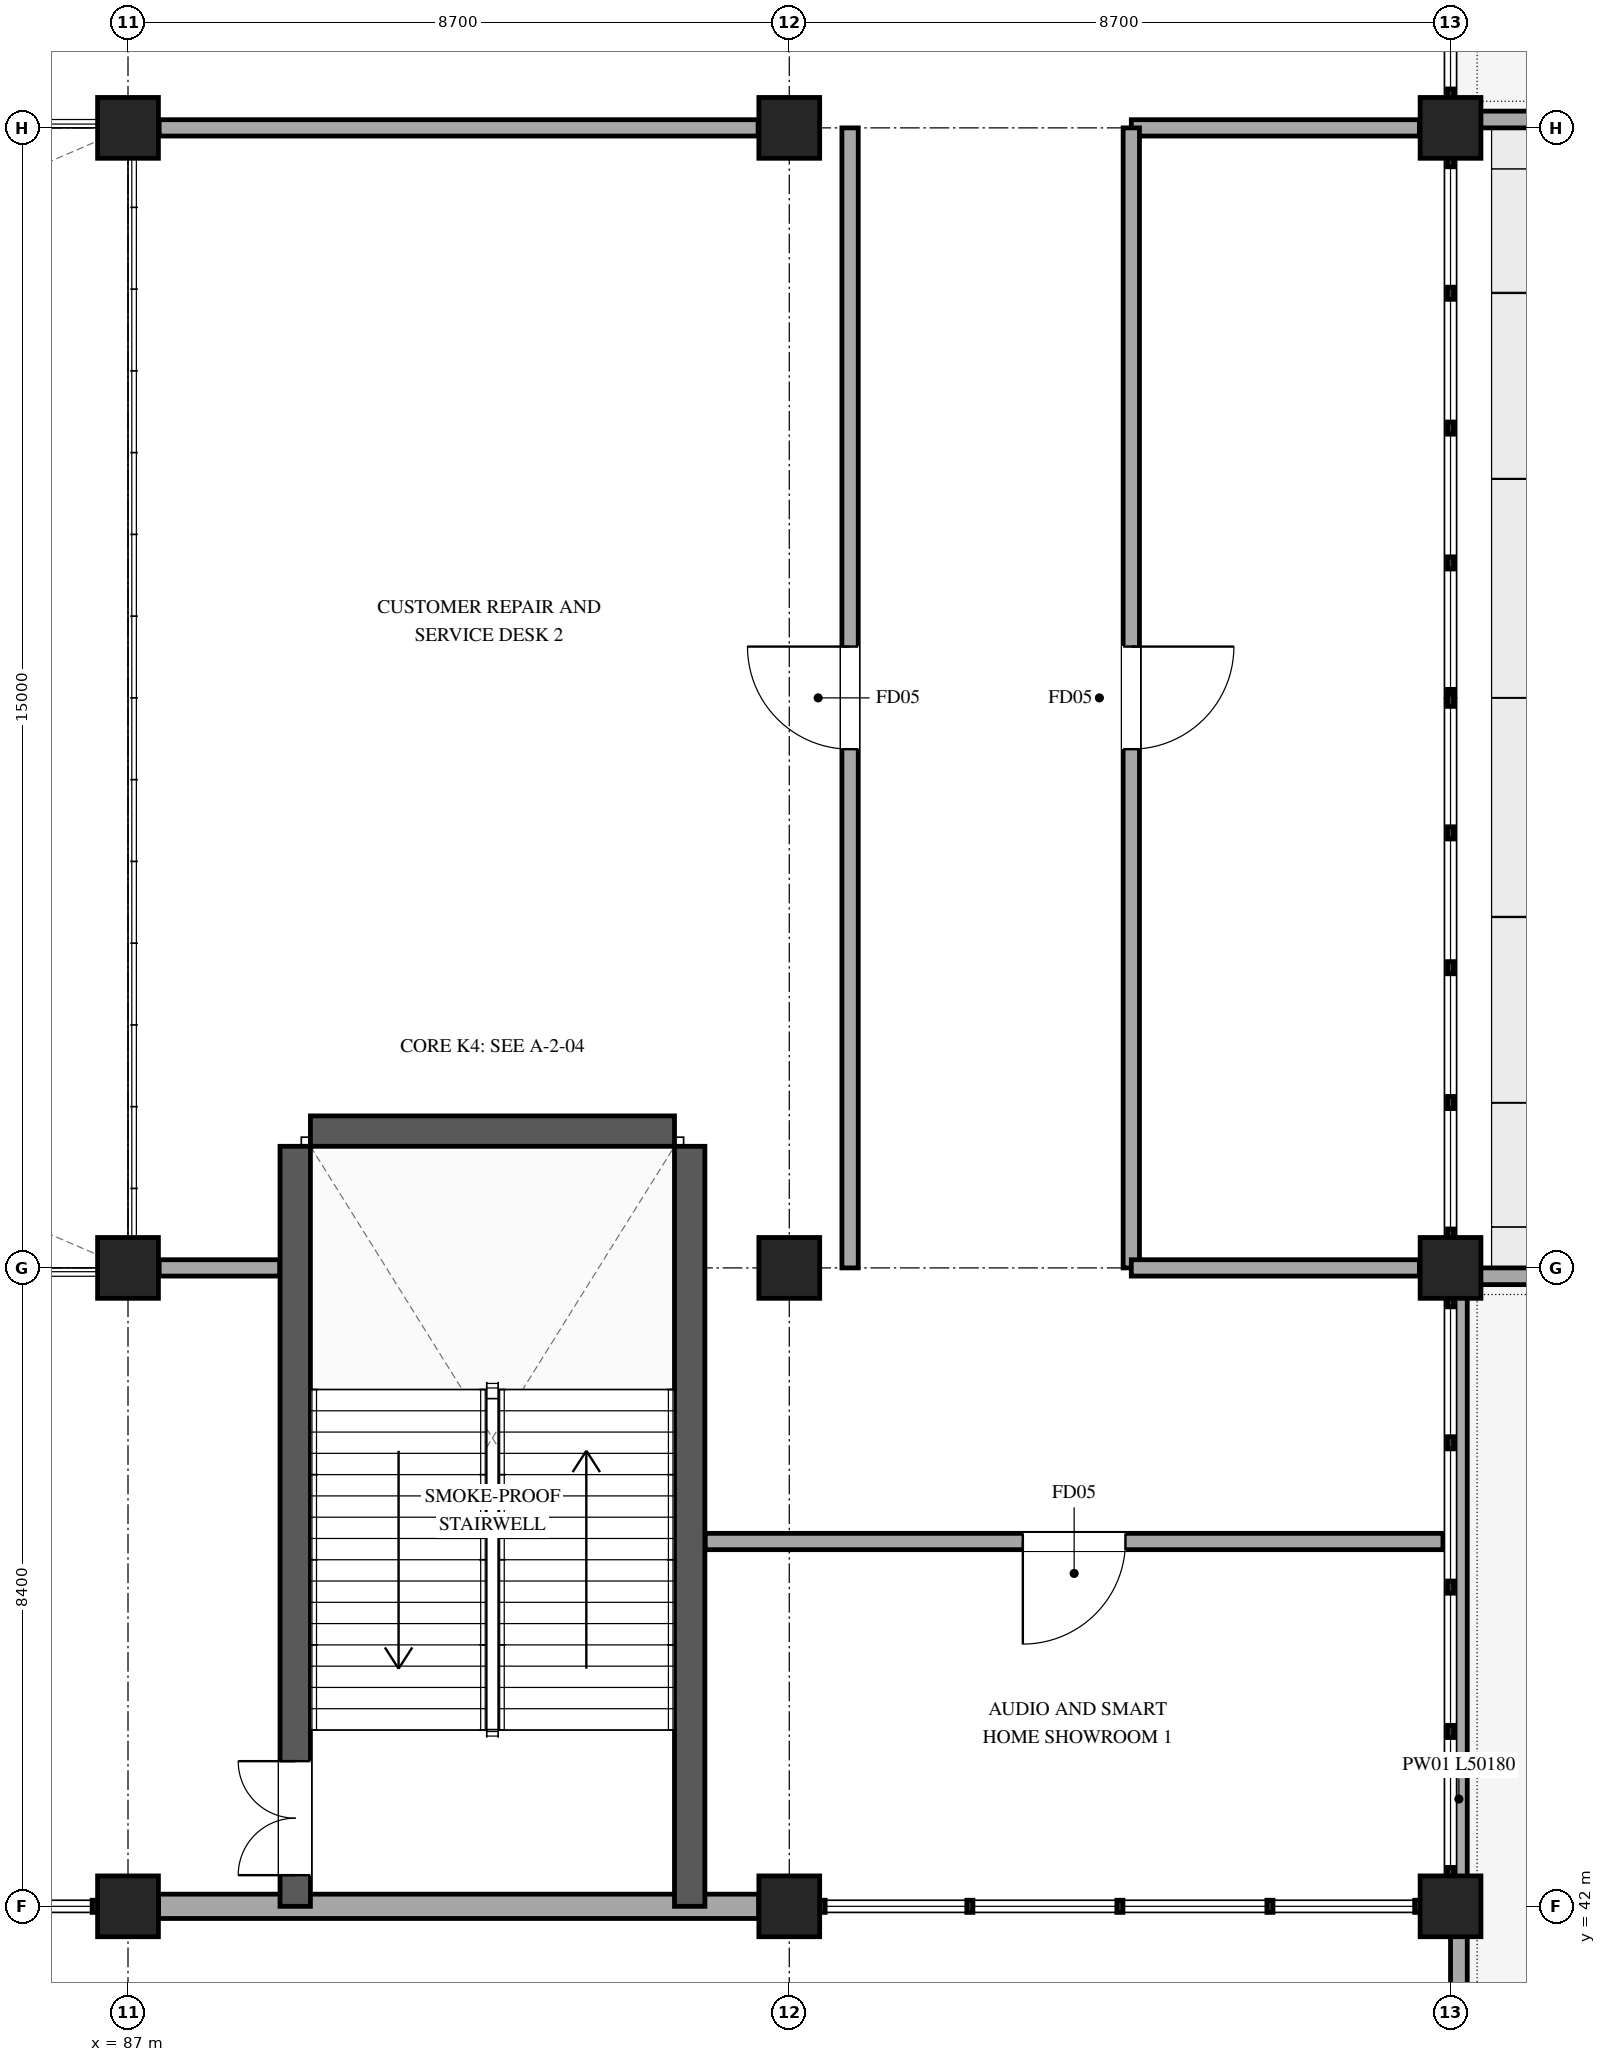
"""IFC4 building model, lengths in metres.
Left out: names, types, materials, properties, quantities, classifications, styles, units other than length and angle.
Written with IfcOpenShell. Run it as: python <this file> out.ifc"""

import sys

from ifc_helpers import new_model, si_unit, direction, frame, frame_2d, origin, origin_2d, place, context, subcontext, project, spatial, rectangle, extrude, element, fill, save


model = new_model("IFC4")
c1 = context("Model", 3, precision=1e-05, world=origin(), true_north=direction((0.0, 1.0)))
c2 = subcontext(c1, "Body", "Model", "MODEL_VIEW")
j1 = project(units=[si_unit("LENGTHUNIT", "METRE"), si_unit("PLANEANGLEUNIT", "RADIAN")], contexts=[c1])
p1 = place(None, origin())
s1 = spatial("IfcSite", under=j1, at=p1, CompositionType="ELEMENT")
p2 = place(p1, origin())
s2 = spatial("IfcBuilding", under=s1, at=p2, CompositionType="ELEMENT")
p3 = place(p2, frame((0.0, 0.0, 16.5)))
s3 = spatial("IfcBuildingStorey", under=s2, at=p3, CompositionType="ELEMENT", Elevation=16.5)
for number, where, z_axis, x_axis in (
    (1, (87.0, 42.0, 0.0), (0.0, 0.0, 1.0), (1.0, 0.0, 0.0)),
    (2, (87.0, 50.4, 0.0), (0.0, 0.0, 1.0), (1.0, 0.0, 0.0)),
    (3, (87.0, 65.4, 0.0), (0.0, 0.0, 1.0), (1.0, 0.0, 0.0)),
    (4, (95.7, 42.0, 0.0), (0.0, 0.0, 1.0), (1.0, 0.0, 0.0)),
    (5, (95.7, 50.4, 0.0), (0.0, 0.0, 1.0), (1.0, 0.0, 0.0)),
    (6, (95.7, 65.4, 0.0), (0.0, 0.0, 1.0), (1.0, 0.0, 0.0)),
    (7, (104.4, 42.0, 0.0), (0.0, 0.0, 1.0), (1.0, 0.0, 0.0)),
    (8, (104.4, 50.4, 0.0), (0.0, 0.0, 1.0), (1.0, 0.0, 0.0)),
    (9, (104.4, 65.4, 0.0), (0.0, 0.0, 1.0), (1.0, 0.0, 0.0)),
):
    element("IfcColumn", number, at=place(p3, frame(where, z_axis=z_axis, x_axis=x_axis)), inside=s3, PredefinedType="COLUMN", context=c2, shape_type="SweptSolid", body=[
        extrude(rectangle(XDim=0.8, YDim=0.8, at=origin_2d()), origin(), (0.0, 0.0, 1.0), 5.1),
    ])
p4 = place(p3, frame((95.298, 42.0, 0.0), z_axis=(0.0, 0.0, 1.0), x_axis=(-1.0, 0.0, 0.0)))
e10 = element("IfcWall", 10, at=p4, inside=s3, PredefinedType="STANDARD", context=c2, shape_type="SweptSolid", body=[
    extrude(rectangle(XDim=7.896, YDim=0.32, at=frame_2d((3.948, 0.0))), origin(), (0.0, 0.0, 1.0), 4.79),
])
p5 = place(p3, frame((104.51, 0.11, 0.0), z_axis=(0.0, 0.0, 1.0), x_axis=(0.0, 1.0, 0.0)))
e11 = element("IfcWall", 11, at=p5, inside=s3, PredefinedType="PARAPET", context=c2, shape_type="SweptSolid", body=[
    extrude(rectangle(XDim=50.18, YDim=0.22, at=frame_2d((25.09, 0.0))), origin(), (0.0, 0.0, 1.0), 1.15),
])
for number, where, z_axis, x_axis in (
    (12, (104.51, 50.29, 0.0), (0.0, 0.0, 1.0), (1.0, 0.0, 0.0)),
    (13, (130.39, 65.51, 0.0), (0.0, 0.0, 1.0), (-1.0, 0.0, 0.0)),
):
    element("IfcWall", number, at=place(p3, frame(where, z_axis=z_axis, x_axis=x_axis)), inside=s3, PredefinedType="PARAPET", context=c2, shape_type="SweptSolid", body=[
        extrude(rectangle(XDim=25.88, YDim=0.22, at=frame_2d((12.94, 0.0))), origin(), (0.0, 0.0, 1.0), 1.15),
    ])
p6 = place(p3, frame((89.2, 42.0, 0.0), z_axis=(0.0, 0.0, 1.0), x_axis=(0.0, 1.0, 0.0)))
e14 = element("IfcWall", 14, at=p6, inside=s3, PredefinedType="SHEAR", context=c2, shape_type="SweptSolid", body=[
    extrude(rectangle(XDim=10.0, YDim=0.4, at=frame_2d((5.0, 0.0))), origin(), (0.0, 0.0, 1.0), 5.1),
])
p7 = place(p6, frame((0.41, 0.0, 0.0)))
e15 = element("IfcOpeningElement", 15, at=p7, cuts=e14, PredefinedType="OPENING", context=c2, shape_type="SweptSolid", body=[
    extrude(rectangle(XDim=1.5, YDim=2.2, at=frame_2d((0.75, 1.1))), frame((0.0, 0.21, 0.0), z_axis=(0.0, -1.0, 0.0), x_axis=(1.0, 0.0, 0.0)), (0.0, 0.0, 1.0), 0.42),
])
p8 = place(p3, frame((94.39, 52.0, 0.0), z_axis=(0.0, 0.0, 1.0), x_axis=(0.0, -1.0, 0.0)))
e16 = element("IfcWall", 16, at=p8, inside=s3, PredefinedType="SHEAR", context=c2, shape_type="SweptSolid", body=[
    extrude(rectangle(XDim=10.0, YDim=0.4, at=frame_2d((5.0, 0.0))), origin(), (0.0, 0.0, 1.0), 5.1),
])
p9 = place(p3, frame((89.4, 52.2, 0.0), z_axis=(0.0, 0.0, 1.0), x_axis=(1.0, 0.0, 0.0)))
e17 = element("IfcWall", 17, at=p9, inside=s3, PredefinedType="SHEAR", context=c2, shape_type="SweptSolid", body=[
    extrude(rectangle(XDim=4.79, YDim=0.4, at=frame_2d((2.395, 0.0))), origin(), (0.0, 0.0, 1.0), 5.1),
])
p10 = place(p3, frame((104.3, 46.8, 0.0), z_axis=(0.0, 0.0, 1.0), x_axis=(-1.0, 0.0, 0.0)))
e18 = element("IfcWall", 18, at=p10, inside=s3, PredefinedType="PARTITIONING", context=c2, shape_type="SweptSolid", body=[
    extrude(rectangle(XDim=9.705, YDim=0.215, at=frame_2d((4.853, 0.0))), origin(), (0.0, 0.0, 1.0), 4.06),
])
p11 = place(p10, frame((4.177, 0.0, 0.0)))
e19 = element("IfcOpeningElement", 19, at=p11, cuts=e18, PredefinedType="OPENING", context=c2, shape_type="SweptSolid", body=[
    extrude(rectangle(XDim=1.35, YDim=2.2, at=frame_2d((0.675, 1.1))), frame((0.0, 0.118, 0.0), z_axis=(0.0, -1.0, 0.0), x_axis=(1.0, 0.0, 0.0)), (0.0, 0.0, 1.0), 0.235),
])
p12 = place(p3, frame((103.99, 65.4, 0.0), z_axis=(0.0, 0.0, 1.0), x_axis=(-1.0, 0.0, 0.0)))
e20 = element("IfcWall", 20, at=p12, inside=s3, PredefinedType="PARTITIONING", context=c2, shape_type="SweptSolid", body=[
    extrude(rectangle(XDim=3.79, YDim=0.215, at=frame_2d((1.895, 0.0))), origin(), (0.0, 0.0, 1.0), 4.06),
])
p13 = place(p3, frame((100.2, 65.4, 0.0), z_axis=(0.0, 0.0, 1.0), x_axis=(0.0, -1.0, 0.0)))
e21 = element("IfcWall", 21, at=p13, inside=s3, PredefinedType="PARTITIONING", context=c2, shape_type="SweptSolid", body=[
    extrude(rectangle(XDim=15.0, YDim=0.215, at=frame_2d((7.5, 0.0))), origin(), (0.0, 0.0, 1.0), 4.06),
])
p14 = place(p13, frame((6.825, 0.0, 0.0)))
e22 = element("IfcOpeningElement", 22, at=p14, cuts=e21, PredefinedType="OPENING", context=c2, shape_type="SweptSolid", body=[
    extrude(rectangle(XDim=1.35, YDim=2.2, at=frame_2d((0.675, 1.1))), frame((0.0, 0.118, 0.0), z_axis=(0.0, -1.0, 0.0), x_axis=(1.0, 0.0, 0.0)), (0.0, 0.0, 1.0), 0.235),
])
p15 = place(p3, frame((100.2, 50.4, 0.0), z_axis=(0.0, 0.0, 1.0), x_axis=(1.0, 0.0, 0.0)))
e23 = element("IfcWall", 23, at=p15, inside=s3, PredefinedType="PARTITIONING", context=c2, shape_type="SweptSolid", body=[
    extrude(rectangle(XDim=3.79, YDim=0.215, at=frame_2d((1.895, 0.0))), origin(), (0.0, 0.0, 1.0), 4.06),
])
p16 = place(p3, frame((87.41, 50.4, 0.0), z_axis=(0.0, 0.0, 1.0), x_axis=(1.0, 0.0, 0.0)))
e24 = element("IfcWall", 24, at=p16, inside=s3, PredefinedType="PARTITIONING", context=c2, shape_type="SweptSolid", body=[
    extrude(rectangle(XDim=1.585, YDim=0.215, at=frame_2d((0.792, 0.0))), origin(), (0.0, 0.0, 1.0), 4.76),
])
p17 = place(p3, frame((96.5, 50.4, 0.0), z_axis=(0.0, 0.0, 1.0), x_axis=(0.0, 1.0, 0.0)))
e25 = element("IfcWall", 25, at=p17, inside=s3, PredefinedType="PARTITIONING", context=c2, shape_type="SweptSolid", body=[
    extrude(rectangle(XDim=15.0, YDim=0.215, at=frame_2d((7.5, 0.0))), origin(), (0.0, 0.0, 1.0), 4.06),
])
p18 = place(p17, frame((6.825, 0.0, 0.0)))
e26 = element("IfcOpeningElement", 26, at=p18, cuts=e25, PredefinedType="OPENING", context=c2, shape_type="SweptSolid", body=[
    extrude(rectangle(XDim=1.35, YDim=2.2, at=frame_2d((0.675, 1.1))), frame((0.0, 0.118, 0.0), z_axis=(0.0, -1.0, 0.0), x_axis=(1.0, 0.0, 0.0)), (0.0, 0.0, 1.0), 0.235),
])
p19 = place(p3, frame((95.29, 65.4, 0.0), z_axis=(0.0, 0.0, 1.0), x_axis=(-1.0, 0.0, 0.0)))
e27 = element("IfcWall", 27, at=p19, inside=s3, PredefinedType="PARTITIONING", context=c2, shape_type="SweptSolid", body=[
    extrude(rectangle(XDim=7.88, YDim=0.215, at=frame_2d((3.94, 0.0))), origin(), (0.0, 0.0, 1.0), 4.06),
])
p20 = place(p7, origin())
e28 = element("IfcDoor", 28, at=p20, inside=s3, OperationType="DOUBLE_DOOR_SINGLE_SWING", PredefinedType="DOOR", context=c2, shape_type="SweptSolid", body=[
    extrude(rectangle(XDim=1.5, YDim=2.2, at=frame_2d((0.75, 1.1))), frame((0.0, 0.025, 0.0), z_axis=(0.0, -1.0, 0.0), x_axis=(1.0, 0.0, 0.0)), (0.0, 0.0, 1.0), 0.05),
])
fill(e15, e28)
p21 = place(p11, origin())
e29 = element("IfcDoor", 29, at=p21, inside=s3, OperationType="SINGLE_SWING_RIGHT", PredefinedType="DOOR", context=c2, shape_type="SweptSolid", body=[
    extrude(rectangle(XDim=1.35, YDim=2.2, at=frame_2d((0.675, 1.1))), frame((0.0, 0.025, 0.0), z_axis=(0.0, -1.0, 0.0), x_axis=(1.0, 0.0, 0.0)), (0.0, 0.0, 1.0), 0.05),
])
fill(e19, e29)
p22 = place(p14, origin())
e30 = element("IfcDoor", 30, at=p22, inside=s3, OperationType="SINGLE_SWING_LEFT", PredefinedType="DOOR", context=c2, shape_type="SweptSolid", body=[
    extrude(rectangle(XDim=1.35, YDim=2.2, at=frame_2d((0.675, 1.1))), frame((0.0, 0.025, 0.0), z_axis=(0.0, -1.0, 0.0), x_axis=(1.0, 0.0, 0.0)), (0.0, 0.0, 1.0), 0.05),
])
fill(e22, e30)
p23 = place(p18, origin())
e31 = element("IfcDoor", 31, at=p23, inside=s3, OperationType="SINGLE_SWING_RIGHT", PredefinedType="DOOR", context=c2, shape_type="SweptSolid", body=[
    extrude(rectangle(XDim=1.35, YDim=2.2, at=frame_2d((0.675, 1.1))), frame((0.0, 0.025, 0.0), z_axis=(0.0, -1.0, 0.0), x_axis=(1.0, 0.0, 0.0)), (0.0, 0.0, 1.0), 0.05),
])
fill(e26, e31)
save(model, sys.argv[1])
